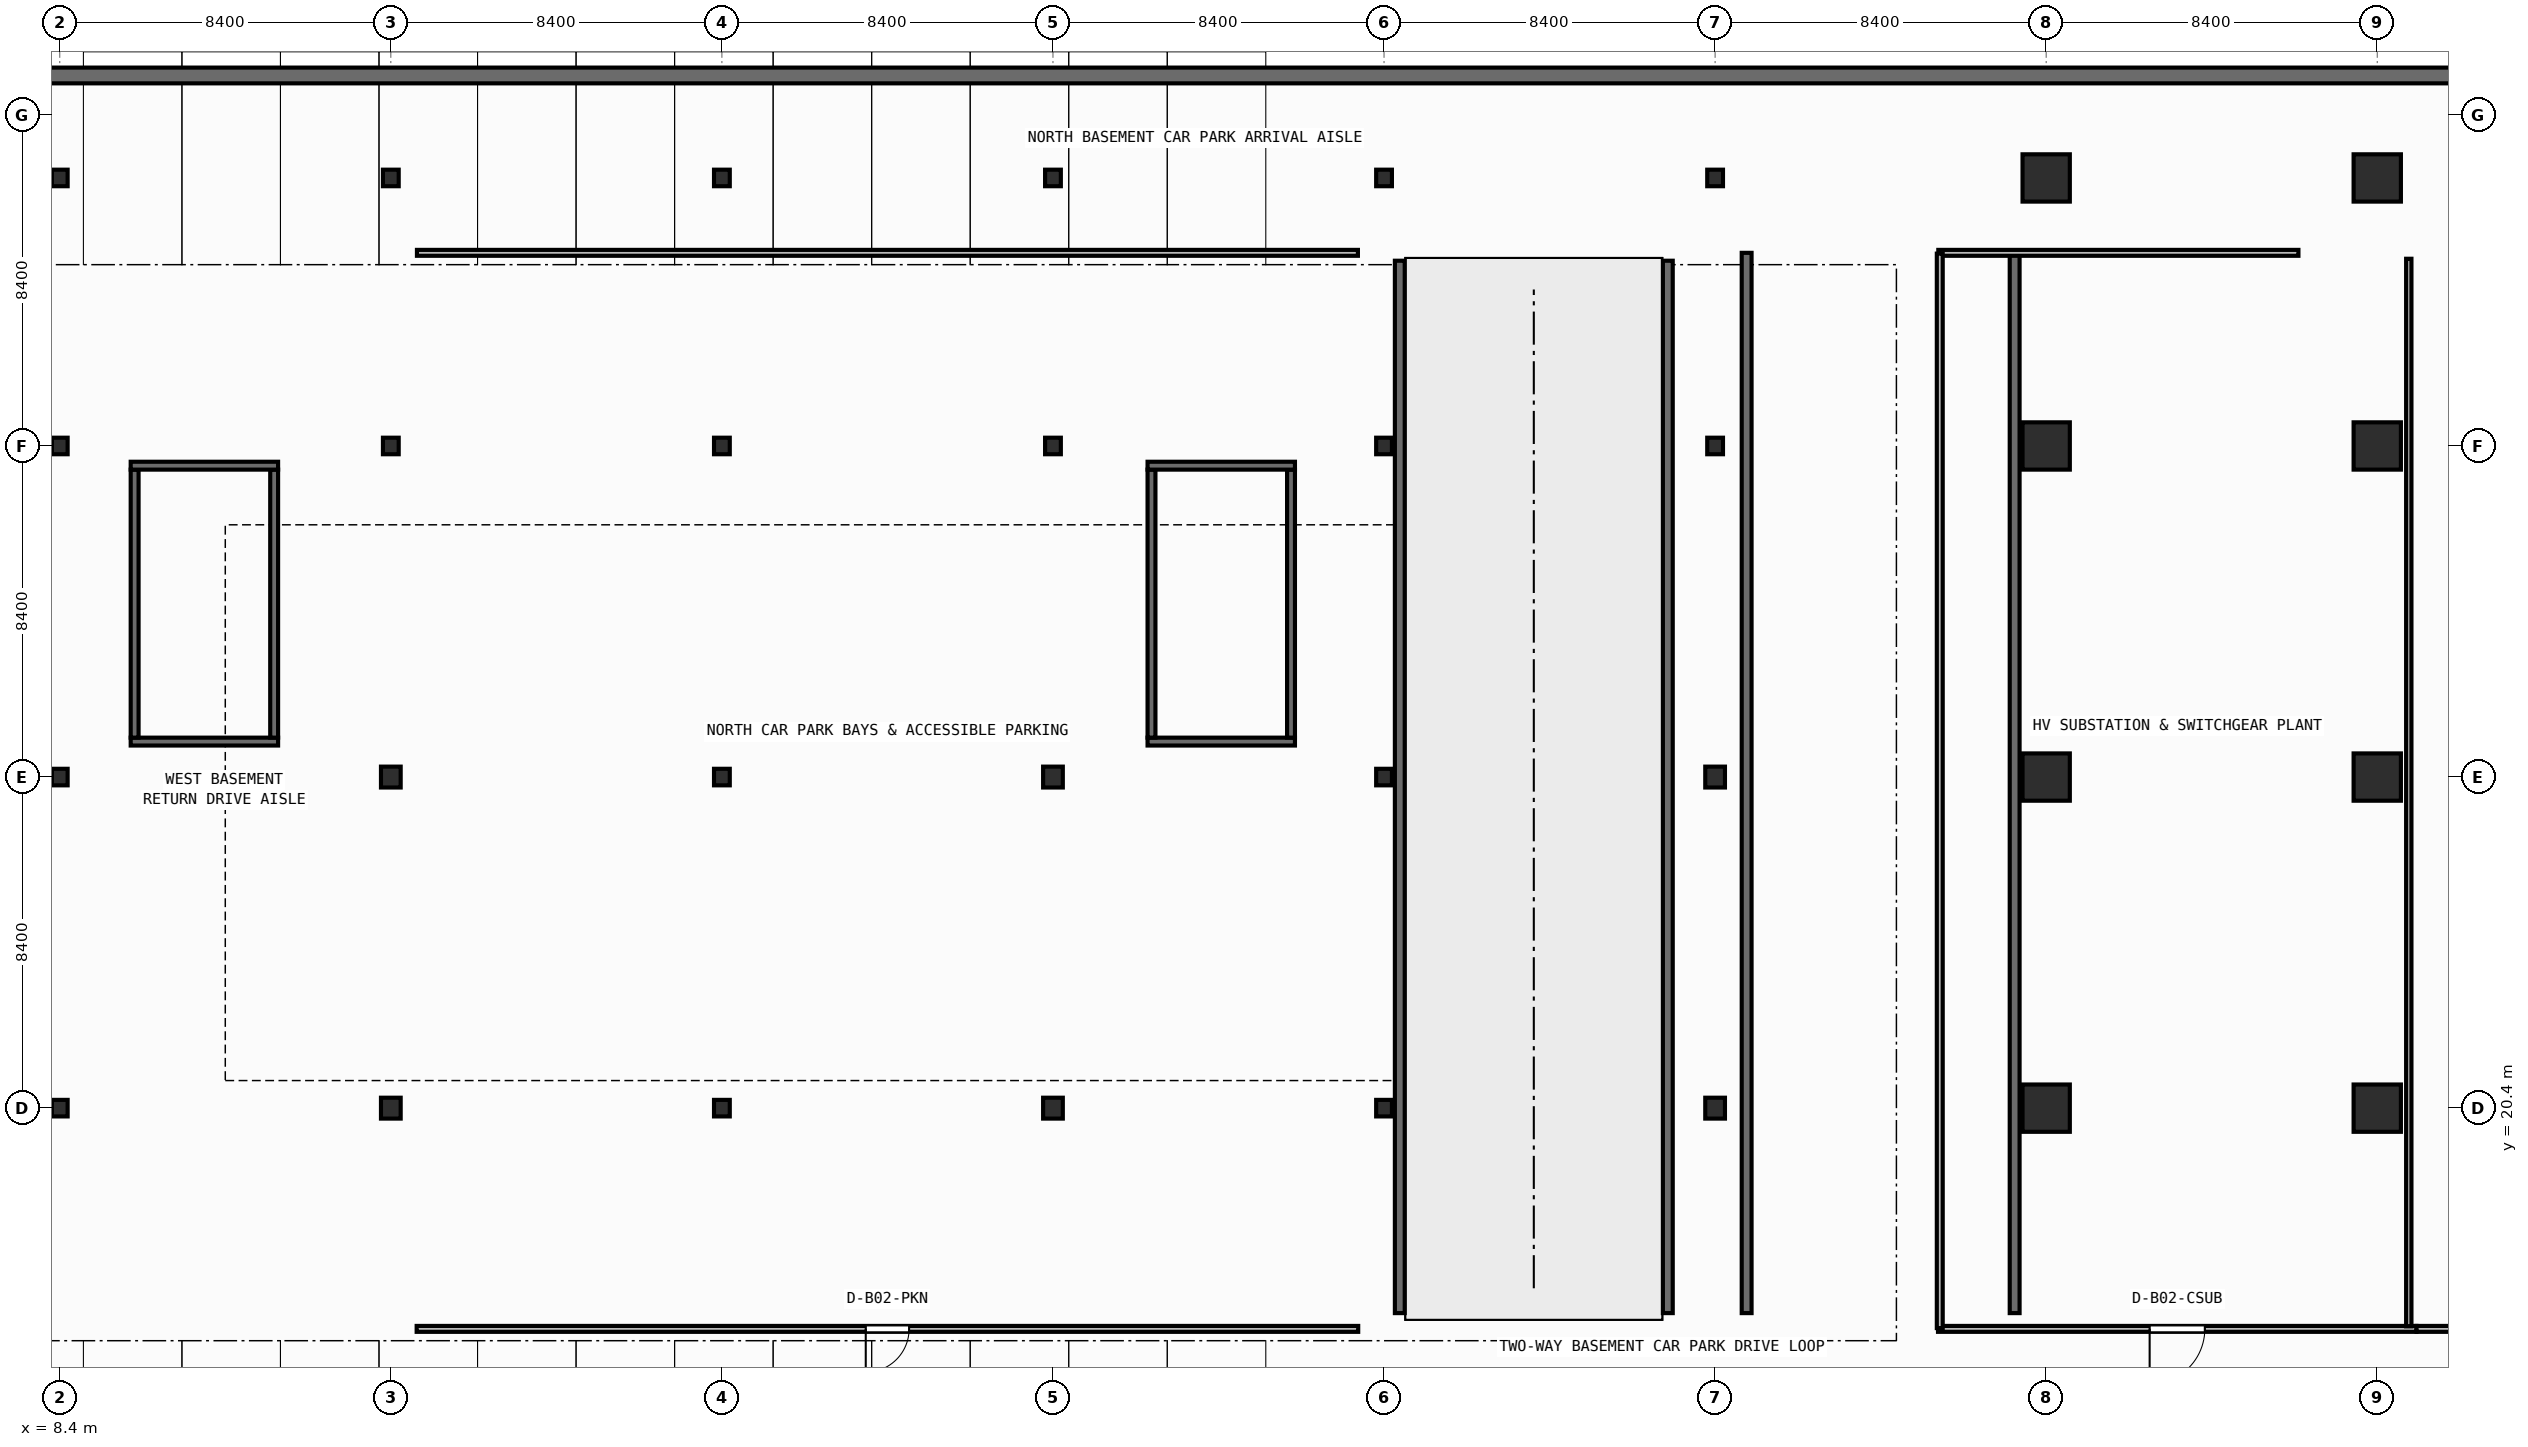
"""IFC4 building model, lengths in metres.
Left out: names, types, materials, properties, quantities, classifications, styles, units other than length and angle.
Written with IfcOpenShell. Run it as: python <this file> out.ifc"""

import sys

from ifc_helpers import new_model, si_unit, direction, frame, frame_2d, origin, origin_2d, place, context, subcontext, project, spatial, rectangle, circle, i_section, extrude, element, fill, save


model = new_model("IFC4")
c1 = context("Model", 3, precision=1e-05, world=origin(), true_north=direction((0.0, 1.0)))
c2 = subcontext(c1, "Body", "Model", "MODEL_VIEW")
j1 = project(units=[si_unit("LENGTHUNIT", "METRE"), si_unit("PLANEANGLEUNIT", "RADIAN")], contexts=[c1])
p1 = place(None, origin())
s1 = spatial("IfcSite", under=j1, at=p1, CompositionType="ELEMENT")
p2 = place(p1, origin())
s2 = spatial("IfcBuilding", under=s1, at=p2, CompositionType="ELEMENT")
p3 = place(p2, frame((0.0, 0.0, -9.0)))
s3 = spatial("IfcBuildingStorey", under=s2, at=p3, CompositionType="ELEMENT", Elevation=-9.0)
p4 = place(p3, frame((8.4, 20.4, 0.0), z_axis=(0.0, 0.0, 1.0), x_axis=(1.0, 0.0, 0.0)))
e1 = element("IfcColumn", 1, at=p4, inside=s3, PredefinedType="COLUMN", context=c2, shape_type="SweptSolid", body=[
    extrude(i_section(OverallWidth=0.4, OverallDepth=0.42, WebThickness=0.025, FlangeThickness=0.04, at=origin_2d()), origin(), (0.0, 0.0, 1.0), 4.5),
])
p5 = place(p3, frame((16.8, 20.4, 0.0), z_axis=(0.0, 0.0, 1.0), x_axis=(1.0, 0.0, 0.0)))
e2 = element("IfcColumn", 2, at=p5, inside=s3, PredefinedType="COLUMN", context=c2, shape_type="SweptSolid", body=[
    extrude(i_section(OverallWidth=0.5, OverallDepth=0.53, WebThickness=0.028, FlangeThickness=0.045, at=origin_2d()), origin(), (0.0, 0.0, 1.0), 4.5),
])
p6 = place(p3, frame((25.2, 20.4, 0.0), z_axis=(0.0, 0.0, 1.0), x_axis=(1.0, 0.0, 0.0)))
e3 = element("IfcColumn", 3, at=p6, inside=s3, PredefinedType="COLUMN", context=c2, shape_type="SweptSolid", body=[
    extrude(i_section(OverallWidth=0.4, OverallDepth=0.42, WebThickness=0.025, FlangeThickness=0.04, at=origin_2d()), origin(), (0.0, 0.0, 1.0), 4.5),
])
p7 = place(p3, frame((33.6, 20.4, 0.0), z_axis=(0.0, 0.0, 1.0), x_axis=(1.0, 0.0, 0.0)))
e4 = element("IfcColumn", 4, at=p7, inside=s3, PredefinedType="COLUMN", context=c2, shape_type="SweptSolid", body=[
    extrude(i_section(OverallWidth=0.5, OverallDepth=0.53, WebThickness=0.028, FlangeThickness=0.045, at=origin_2d()), origin(), (0.0, 0.0, 1.0), 4.5),
])
p8 = place(p3, frame((42.0, 20.4, 0.0), z_axis=(0.0, 0.0, 1.0), x_axis=(1.0, 0.0, 0.0)))
e5 = element("IfcColumn", 5, at=p8, inside=s3, PredefinedType="COLUMN", context=c2, shape_type="SweptSolid", body=[
    extrude(i_section(OverallWidth=0.4, OverallDepth=0.42, WebThickness=0.025, FlangeThickness=0.04, at=origin_2d()), origin(), (0.0, 0.0, 1.0), 4.5),
])
p9 = place(p3, frame((50.4, 20.4, 0.0), z_axis=(0.0, 0.0, 1.0), x_axis=(1.0, 0.0, 0.0)))
e6 = element("IfcColumn", 6, at=p9, inside=s3, PredefinedType="COLUMN", context=c2, shape_type="SweptSolid", body=[
    extrude(i_section(OverallWidth=0.5, OverallDepth=0.53, WebThickness=0.028, FlangeThickness=0.045, at=origin_2d()), origin(), (0.0, 0.0, 1.0), 4.5),
])
for number, where, z_axis, x_axis in (
    (7, (58.8, 20.4, 0.0), (0.0, 0.0, 1.0), (1.0, 0.0, 0.0)),
    (8, (67.2, 20.4, 0.0), (0.0, 0.0, 1.0), (1.0, 0.0, 0.0)),
):
    element("IfcColumn", number, at=place(p3, frame(where, z_axis=z_axis, x_axis=x_axis)), inside=s3, PredefinedType="COLUMN", context=c2, shape_type="SweptSolid", body=[
        extrude(rectangle(XDim=1.2, YDim=1.2, at=origin_2d()), origin(), (0.0, 0.0, 1.0), 4.5),
    ])
p10 = place(p3, frame((8.4, 28.8, 0.0), z_axis=(0.0, 0.0, 1.0), x_axis=(1.0, 0.0, 0.0)))
e9 = element("IfcColumn", 9, at=p10, inside=s3, PredefinedType="COLUMN", context=c2, shape_type="SweptSolid", body=[
    extrude(i_section(OverallWidth=0.4, OverallDepth=0.42, WebThickness=0.025, FlangeThickness=0.04, at=origin_2d()), origin(), (0.0, 0.0, 1.0), 4.5),
])
p11 = place(p3, frame((16.8, 28.8, 0.0), z_axis=(0.0, 0.0, 1.0), x_axis=(1.0, 0.0, 0.0)))
e10 = element("IfcColumn", 10, at=p11, inside=s3, PredefinedType="COLUMN", context=c2, shape_type="SweptSolid", body=[
    extrude(i_section(OverallWidth=0.5, OverallDepth=0.53, WebThickness=0.028, FlangeThickness=0.045, at=origin_2d()), origin(), (0.0, 0.0, 1.0), 4.5),
])
p12 = place(p3, frame((25.2, 28.8, 0.0), z_axis=(0.0, 0.0, 1.0), x_axis=(1.0, 0.0, 0.0)))
e11 = element("IfcColumn", 11, at=p12, inside=s3, PredefinedType="COLUMN", context=c2, shape_type="SweptSolid", body=[
    extrude(i_section(OverallWidth=0.4, OverallDepth=0.42, WebThickness=0.025, FlangeThickness=0.04, at=origin_2d()), origin(), (0.0, 0.0, 1.0), 4.5),
])
p13 = place(p3, frame((33.6, 28.8, 0.0), z_axis=(0.0, 0.0, 1.0), x_axis=(1.0, 0.0, 0.0)))
e12 = element("IfcColumn", 12, at=p13, inside=s3, PredefinedType="COLUMN", context=c2, shape_type="SweptSolid", body=[
    extrude(i_section(OverallWidth=0.5, OverallDepth=0.53, WebThickness=0.028, FlangeThickness=0.045, at=origin_2d()), origin(), (0.0, 0.0, 1.0), 4.5),
])
p14 = place(p3, frame((42.0, 28.8, 0.0), z_axis=(0.0, 0.0, 1.0), x_axis=(1.0, 0.0, 0.0)))
e13 = element("IfcColumn", 13, at=p14, inside=s3, PredefinedType="COLUMN", context=c2, shape_type="SweptSolid", body=[
    extrude(i_section(OverallWidth=0.4, OverallDepth=0.42, WebThickness=0.025, FlangeThickness=0.04, at=origin_2d()), origin(), (0.0, 0.0, 1.0), 4.5),
])
p15 = place(p3, frame((50.4, 28.8, 0.0), z_axis=(0.0, 0.0, 1.0), x_axis=(1.0, 0.0, 0.0)))
e14 = element("IfcColumn", 14, at=p15, inside=s3, PredefinedType="COLUMN", context=c2, shape_type="SweptSolid", body=[
    extrude(i_section(OverallWidth=0.5, OverallDepth=0.53, WebThickness=0.028, FlangeThickness=0.045, at=origin_2d()), origin(), (0.0, 0.0, 1.0), 4.5),
])
for number, where, z_axis, x_axis in (
    (15, (58.8, 28.8, 0.0), (0.0, 0.0, 1.0), (1.0, 0.0, 0.0)),
    (16, (67.2, 28.8, 0.0), (0.0, 0.0, 1.0), (1.0, 0.0, 0.0)),
):
    element("IfcColumn", number, at=place(p3, frame(where, z_axis=z_axis, x_axis=x_axis)), inside=s3, PredefinedType="COLUMN", context=c2, shape_type="SweptSolid", body=[
        extrude(circle(Radius=0.6, at=origin_2d()), origin(), (0.0, 0.0, 1.0), 4.5),
    ])
for number, where, z_axis, x_axis in (
    (17, (8.4, 37.2, 0.0), (0.0, 0.0, 1.0), (1.0, 0.0, 0.0)),
    (18, (16.8, 37.2, 0.0), (0.0, 0.0, 1.0), (1.0, 0.0, 0.0)),
    (19, (25.2, 37.2, 0.0), (0.0, 0.0, 1.0), (1.0, 0.0, 0.0)),
    (20, (33.6, 37.2, 0.0), (0.0, 0.0, 1.0), (1.0, 0.0, 0.0)),
    (21, (42.0, 37.2, 0.0), (0.0, 0.0, 1.0), (1.0, 0.0, 0.0)),
    (22, (50.4, 37.2, 0.0), (0.0, 0.0, 1.0), (1.0, 0.0, 0.0)),
):
    element("IfcColumn", number, at=place(p3, frame(where, z_axis=z_axis, x_axis=x_axis)), inside=s3, PredefinedType="COLUMN", context=c2, shape_type="SweptSolid", body=[
        extrude(i_section(OverallWidth=0.4, OverallDepth=0.42, WebThickness=0.025, FlangeThickness=0.04, at=origin_2d()), origin(), (0.0, 0.0, 1.0), 4.5),
    ])
for number, where, z_axis, x_axis in (
    (23, (58.8, 37.2, 0.0), (0.0, 0.0, 1.0), (1.0, 0.0, 0.0)),
    (24, (67.2, 37.2, 0.0), (0.0, 0.0, 1.0), (1.0, 0.0, 0.0)),
):
    element("IfcColumn", number, at=place(p3, frame(where, z_axis=z_axis, x_axis=x_axis)), inside=s3, PredefinedType="COLUMN", context=c2, shape_type="SweptSolid", body=[
        extrude(circle(Radius=0.6, at=origin_2d()), origin(), (0.0, 0.0, 1.0), 4.5),
    ])
for number, where, z_axis, x_axis in (
    (25, (8.4, 44.0, 0.0), (0.0, 0.0, 1.0), (1.0, 0.0, 0.0)),
    (26, (16.8, 44.0, 0.0), (0.0, 0.0, 1.0), (1.0, 0.0, 0.0)),
    (27, (25.2, 44.0, 0.0), (0.0, 0.0, 1.0), (1.0, 0.0, 0.0)),
    (28, (33.6, 44.0, 0.0), (0.0, 0.0, 1.0), (1.0, 0.0, 0.0)),
    (29, (42.0, 44.0, 0.0), (0.0, 0.0, 1.0), (1.0, 0.0, 0.0)),
    (30, (50.4, 44.0, 0.0), (0.0, 0.0, 1.0), (1.0, 0.0, 0.0)),
):
    element("IfcColumn", number, at=place(p3, frame(where, z_axis=z_axis, x_axis=x_axis)), inside=s3, PredefinedType="COLUMN", context=c2, shape_type="SweptSolid", body=[
        extrude(i_section(OverallWidth=0.4, OverallDepth=0.42, WebThickness=0.025, FlangeThickness=0.04, at=origin_2d()), origin(), (0.0, 0.0, 1.0), 4.5),
    ])
for number, where, z_axis, x_axis in (
    (31, (58.8, 44.0, 0.0), (0.0, 0.0, 1.0), (1.0, 0.0, 0.0)),
    (32, (67.2, 44.0, 0.0), (0.0, 0.0, 1.0), (1.0, 0.0, 0.0)),
):
    element("IfcColumn", number, at=place(p3, frame(where, z_axis=z_axis, x_axis=x_axis)), inside=s3, PredefinedType="COLUMN", context=c2, shape_type="SweptSolid", body=[
        extrude(circle(Radius=0.6, at=origin_2d()), origin(), (0.0, 0.0, 1.0), 4.5),
    ])
p16 = place(p3, frame((85.4, 46.6, 0.0), z_axis=(0.0, 0.0, 1.0), x_axis=(-1.0, 0.0, 0.0)))
e33 = element("IfcWall", 33, at=p16, inside=s3, PredefinedType="STANDARD", context=c2, shape_type="SweptSolid", body=[
    extrude(rectangle(XDim=85.4, YDim=0.4, at=frame_2d((42.7, 0.0))), origin(), (0.0, 0.0, 1.0), 4.24),
])
p17 = place(p3, frame((10.2, 29.7, 0.0), z_axis=(0.0, 0.0, 1.0), x_axis=(1.0, 0.0, 0.0)))
e34 = element("IfcWall", 34, at=p17, inside=s3, PredefinedType="SHEAR", context=c2, shape_type="SweptSolid", body=[
    extrude(rectangle(XDim=3.74, YDim=0.2, at=frame_2d((1.87, 0.0))), origin(), (0.0, 0.0, 1.0), 4.24),
])
for number, where, z_axis, x_axis in (
    (35, (10.3, 29.8, 0.0), (0.0, 0.0, 1.0), (0.0, 1.0, 0.0)),
    (36, (13.84, 29.8, 0.0), (0.0, 0.0, 1.0), (0.0, 1.0, 0.0)),
):
    element("IfcWall", number, at=place(p3, frame(where, z_axis=z_axis, x_axis=x_axis)), inside=s3, PredefinedType="SHEAR", context=c2, shape_type="SweptSolid", body=[
        extrude(rectangle(XDim=6.8, YDim=0.2, at=frame_2d((3.4, 0.0))), origin(), (0.0, 0.0, 1.0), 4.24),
    ])
for number, where, z_axis, x_axis in (
    (37, (10.2, 36.7, 0.0), (0.0, 0.0, 1.0), (1.0, 0.0, 0.0)),
    (38, (36.0, 29.7, 0.0), (0.0, 0.0, 1.0), (1.0, 0.0, 0.0)),
):
    element("IfcWall", number, at=place(p3, frame(where, z_axis=z_axis, x_axis=x_axis)), inside=s3, PredefinedType="SHEAR", context=c2, shape_type="SweptSolid", body=[
        extrude(rectangle(XDim=3.74, YDim=0.2, at=frame_2d((1.87, 0.0))), origin(), (0.0, 0.0, 1.0), 4.24),
    ])
for number, where, z_axis, x_axis in (
    (39, (36.1, 29.8, 0.0), (0.0, 0.0, 1.0), (0.0, 1.0, 0.0)),
    (40, (39.64, 29.8, 0.0), (0.0, 0.0, 1.0), (0.0, 1.0, 0.0)),
):
    element("IfcWall", number, at=place(p3, frame(where, z_axis=z_axis, x_axis=x_axis)), inside=s3, PredefinedType="SHEAR", context=c2, shape_type="SweptSolid", body=[
        extrude(rectangle(XDim=6.8, YDim=0.2, at=frame_2d((3.4, 0.0))), origin(), (0.0, 0.0, 1.0), 4.24),
    ])
p18 = place(p3, frame((36.0, 36.7, 0.0), z_axis=(0.0, 0.0, 1.0), x_axis=(1.0, 0.0, 0.0)))
e41 = element("IfcWall", 41, at=p18, inside=s3, PredefinedType="SHEAR", context=c2, shape_type="SweptSolid", body=[
    extrude(rectangle(XDim=3.74, YDim=0.2, at=frame_2d((1.87, 0.0))), origin(), (0.0, 0.0, 1.0), 4.24),
])
for number, where, z_axis, x_axis in (
    (42, (42.4, 15.2, 0.0), (0.0, 0.0, 1.0), (0.0, 1.0, 0.0)),
    (43, (49.2, 15.2, 0.0), (0.0, 0.0, 1.0), (0.0, 1.0, 0.0)),
):
    element("IfcWall", number, at=place(p3, frame(where, z_axis=z_axis, x_axis=x_axis)), inside=s3, PredefinedType="SHEAR", context=c2, shape_type="SweptSolid", body=[
        extrude(rectangle(XDim=26.7, YDim=0.25, at=frame_2d((13.35, 0.0))), origin(), (0.0, 0.0, 1.0), 4.24),
    ])
for number, where, z_axis, x_axis in (
    (44, (51.2, 15.2, 0.0), (0.0, 0.0, 1.0), (0.0, 1.0, 0.0)),
    (45, (58.0, 15.2, 0.0), (0.0, 0.0, 1.0), (0.0, 1.0, 0.0)),
):
    element("IfcWall", number, at=place(p3, frame(where, z_axis=z_axis, x_axis=x_axis)), inside=s3, PredefinedType="SHEAR", context=c2, shape_type="SweptSolid", body=[
        extrude(rectangle(XDim=26.9, YDim=0.25, at=frame_2d((13.45, 0.0))), origin(), (0.0, 0.0, 1.0), 4.24),
    ])
p19 = place(p3, frame((41.344, 14.8, 0.0), z_axis=(0.0, 0.0, 1.0), x_axis=(-1.0, 0.0, 0.0)))
e46 = element("IfcWall", 46, at=p19, inside=s3, PredefinedType="PARTITIONING", context=c2, shape_type="SweptSolid", body=[
    extrude(rectangle(XDim=23.889, YDim=0.15, at=frame_2d((11.945, 0.0))), origin(), (0.0, 0.0, 1.0), 4.24),
])
p20 = place(p19, frame((11.395, 0.0, 0.0)))
e47 = element("IfcOpeningElement", 47, at=p20, cuts=e46, PredefinedType="OPENING", context=c2, shape_type="SweptSolid", body=[
    extrude(rectangle(XDim=1.1, YDim=2.1, at=frame_2d((0.55, 1.05))), frame((0.0, 0.085, 0.0), z_axis=(0.0, -1.0, 0.0), x_axis=(1.0, 0.0, 0.0)), (0.0, 0.0, 1.0), 0.17),
])
p21 = place(p3, frame((68.195, 14.8, 0.0), z_axis=(0.0, 0.0, 1.0), x_axis=(-1.0, 0.0, 0.0)))
e48 = element("IfcWall", 48, at=p21, inside=s3, PredefinedType="PARTITIONING", context=c2, shape_type="SweptSolid", body=[
    extrude(rectangle(XDim=12.139, YDim=0.15, at=frame_2d((6.07, 0.0))), origin(), (0.0, 0.0, 1.0), 4.24),
])
p22 = place(p21, frame((5.37, 0.0, 0.0)))
e49 = element("IfcOpeningElement", 49, at=p22, cuts=e48, PredefinedType="OPENING", context=c2, shape_type="SweptSolid", body=[
    extrude(rectangle(XDim=1.4, YDim=2.15, at=frame_2d((0.7, 1.075))), frame((0.0, 0.085, 0.0), z_axis=(0.0, -1.0, 0.0), x_axis=(1.0, 0.0, 0.0)), (0.0, 0.0, 1.0), 0.17),
])
p23 = place(p3, frame((84.5, 14.8, 0.0), z_axis=(0.0, 0.0, 1.0), x_axis=(-1.0, 0.0, 0.0)))
e50 = element("IfcWall", 50, at=p23, inside=s3, PredefinedType="PARTITIONING", context=c2, shape_type="SweptSolid", body=[
    extrude(rectangle(XDim=16.303, YDim=0.15, at=frame_2d((8.152, 0.0))), origin(), (0.0, 0.0, 1.0), 4.24),
])
p24 = place(p23, frame((7.452, 0.0, 0.0)))
e51 = element("IfcOpeningElement", 51, at=p24, cuts=e50, PredefinedType="OPENING", context=c2, shape_type="SweptSolid", body=[
    extrude(rectangle(XDim=1.4, YDim=2.15, at=frame_2d((0.7, 1.075))), frame((0.0, 0.085, 0.0), z_axis=(0.0, -1.0, 0.0), x_axis=(1.0, 0.0, 0.0)), (0.0, 0.0, 1.0), 0.17),
])
p25 = place(p3, frame((17.463, 42.1, 0.0), z_axis=(0.0, 0.0, 1.0), x_axis=(1.0, 0.0, 0.0)))
e52 = element("IfcWall", 52, at=p25, inside=s3, PredefinedType="PARTITIONING", context=c2, shape_type="SweptSolid", body=[
    extrude(rectangle(XDim=23.874, YDim=0.15, at=frame_2d((11.937, 0.0))), origin(), (0.0, 0.0, 1.0), 4.24),
])
p26 = place(p3, frame((56.063, 42.1, 0.0), z_axis=(0.0, 0.0, 1.0), x_axis=(1.0, 0.0, 0.0)))
e53 = element("IfcWall", 53, at=p26, inside=s3, PredefinedType="PARTITIONING", context=c2, shape_type="SweptSolid", body=[
    extrude(rectangle(XDim=9.137, YDim=0.15, at=frame_2d((4.569, 0.0))), origin(), (0.0, 0.0, 1.0), 4.24),
])
p27 = place(p3, frame((56.1, 14.82, 0.0), z_axis=(0.0, 0.0, 1.0), x_axis=(0.0, 1.0, 0.0)))
e54 = element("IfcWall", 54, at=p27, inside=s3, PredefinedType="PARTITIONING", context=c2, shape_type="SweptSolid", body=[
    extrude(rectangle(XDim=27.26, YDim=0.15, at=frame_2d((13.63, 0.0))), origin(), (0.0, 0.0, 1.0), 4.24),
])
p28 = place(p3, frame((68.0, 14.865, 0.0), z_axis=(0.0, 0.0, 1.0), x_axis=(0.0, 1.0, 0.0)))
e55 = element("IfcWall", 55, at=p28, inside=s3, PredefinedType="PARTITIONING", context=c2, shape_type="SweptSolid", body=[
    extrude(rectangle(XDim=27.085, YDim=0.135, at=frame_2d((13.542, 0.0))), origin(), (0.0, 0.0, 1.0), 4.24),
])
p29 = place(p20, origin())
e56 = element("IfcDoor", 56, at=p29, inside=s3, OperationType="SINGLE_SWING_RIGHT", PredefinedType="DOOR", context=c2, shape_type="SweptSolid", body=[
    extrude(rectangle(XDim=1.1, YDim=2.1, at=frame_2d((0.55, 1.05))), frame((0.0, 0.025, 0.0), z_axis=(0.0, -1.0, 0.0), x_axis=(1.0, 0.0, 0.0)), (0.0, 0.0, 1.0), 0.05),
])
fill(e47, e56)
p30 = place(p22, origin())
e57 = element("IfcDoor", 57, at=p30, inside=s3, OperationType="SINGLE_SWING_RIGHT", PredefinedType="DOOR", context=c2, shape_type="SweptSolid", body=[
    extrude(rectangle(XDim=1.4, YDim=2.15, at=frame_2d((0.7, 1.075))), frame((0.0, 0.025, 0.0), z_axis=(0.0, -1.0, 0.0), x_axis=(1.0, 0.0, 0.0)), (0.0, 0.0, 1.0), 0.05),
])
fill(e49, e57)
save(model, sys.argv[1])
